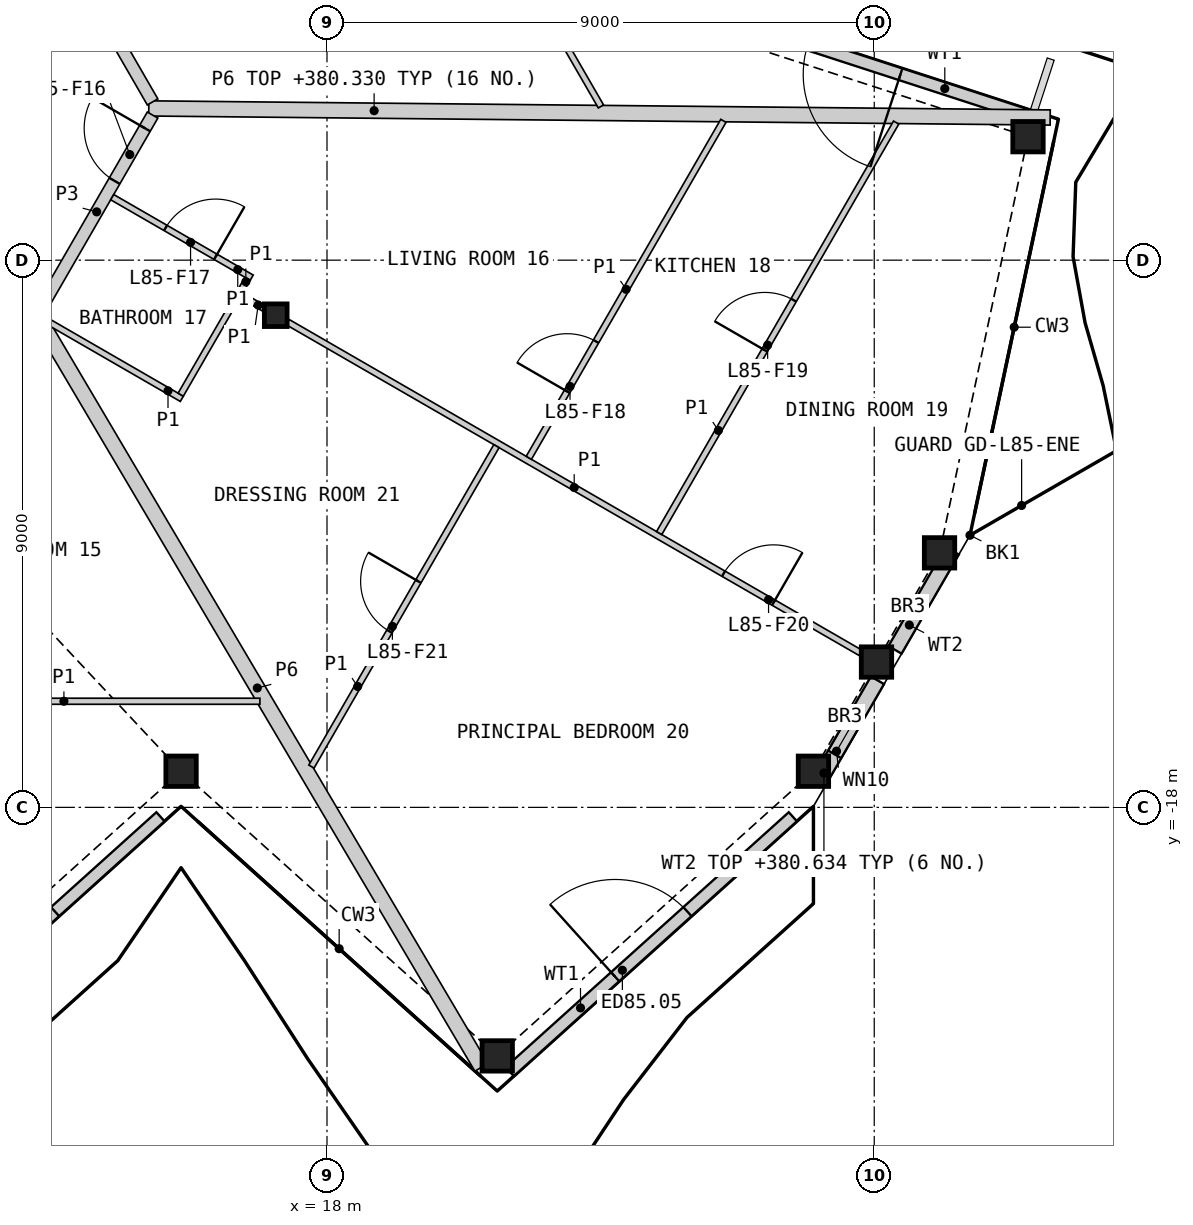
"""IFC4 building model, lengths in metres.
Left out: names, types, materials, properties, quantities, classifications, styles, units other than length and angle.
Written with IfcOpenShell. Run it as: python <this file> out.ifc"""

import sys

from ifc_helpers import new_model, si_unit, direction, frame, frame_2d, origin, origin_2d, place, context, subcontext, project, spatial, rectangle, hollow_rectangle, i_section, extrude, element, fill, save


model = new_model("IFC4")
c1 = context("Model", 3, precision=1e-05, world=origin(), true_north=direction((0.0, 1.0)))
c2 = subcontext(c1, "Body", "Model", "MODEL_VIEW")
j1 = project(units=[si_unit("LENGTHUNIT", "METRE"), si_unit("PLANEANGLEUNIT", "RADIAN")], contexts=[c1])
p1 = place(None, origin())
s1 = spatial("IfcSite", under=j1, at=p1, CompositionType="ELEMENT")
p2 = place(p1, origin())
s2 = spatial("IfcBuilding", under=s1, at=p2, CompositionType="ELEMENT")
p3 = place(p2, frame((0.0, 0.0, 378.0)))
s3 = spatial("IfcBuildingStorey", under=s2, at=p3, CompositionType="ELEMENT", Elevation=378.0)
for number, where, z_axis, x_axis in (
    (1, (15.6, -17.406, 0.0), (0.0, 0.0, 1.0), (1.0, 0.0, 0.0)),
    (2, (20.8, -22.088, 0.0), (0.0, 0.0, 1.0), (1.0, 0.0, 0.0)),
    (3, (26.0, -17.406, 0.0), (0.0, 0.0, 1.0), (1.0, 0.0, 0.0)),
    (4, (27.037, -15.61, 0.0), (0.0, 0.0, 1.0), (1.0, 0.0, 0.0)),
    (5, (28.074, -13.814, 0.0), (0.0, 0.0, 1.0), (1.0, 0.0, 0.0)),
    (6, (29.529, -6.969, 0.0), (0.0, 0.0, 1.0), (1.0, 0.0, 0.0)),
):
    element("IfcColumn", number, at=place(p3, frame(where, z_axis=z_axis, x_axis=x_axis)), inside=s3, PredefinedType="COLUMN", context=c2, shape_type="SweptSolid", body=[
        extrude(hollow_rectangle(XDim=0.5, YDim=0.5, WallThickness=0.03, at=origin_2d()), origin(), (0.0, 0.0, 1.0), 3.4),
    ])
p4 = place(p3, frame((17.157, -9.906, 0.0), z_axis=(0.0, 0.0, 1.0), x_axis=(1.0, 0.0, 0.0)))
e7 = element("IfcColumn", 7, at=p4, inside=s3, PredefinedType="COLUMN", context=c2, shape_type="SweptSolid", body=[
    extrude(i_section(OverallWidth=0.374, OverallDepth=0.372, WebThickness=0.016, FlangeThickness=0.026, at=origin_2d()), origin(), (0.0, 0.0, 1.0), 3.4),
])
p5 = place(p3, frame((10.605, -22.346, 0.0), z_axis=(0.0, 0.0, 1.0), x_axis=(0.743137181878, 0.669139095339, 0.0)))
e8 = element("IfcWall", 8, at=p5, inside=s3, PredefinedType="SOLIDWALL", context=c2, shape_type="SweptSolid", body=[
    extrude(rectangle(XDim=6.265, YDim=0.2, at=frame_2d((3.133, 0.0))), origin(), (0.0, 0.0, 1.0), 2.634),
])
p6 = place(p5, frame((2.333, 0.0, 0.0)))
e9 = element("IfcOpeningElement", 9, at=p6, cuts=e8, PredefinedType="OPENING", context=c2, shape_type="SweptSolid", body=[
    extrude(rectangle(XDim=1.6, YDim=2.25, at=frame_2d((0.8, 1.125))), frame((0.0, 0.11, 0.0), z_axis=(0.0, -1.0, 0.0), x_axis=(1.0, 0.0, 0.0)), (0.0, 0.0, 1.0), 0.22),
])
p7 = place(p3, frame((21.005, -22.346, 0.0), z_axis=(0.0, 0.0, 1.0), x_axis=(0.743137181878, 0.669139095339, 0.0)))
e10 = element("IfcWall", 10, at=p7, inside=s3, PredefinedType="SOLIDWALL", context=c2, shape_type="SweptSolid", body=[
    extrude(rectangle(XDim=6.265, YDim=0.2, at=frame_2d((3.133, 0.0))), origin(), (0.0, 0.0, 1.0), 2.634),
])
p8 = place(p7, frame((2.333, 0.0, 0.0)))
e11 = element("IfcOpeningElement", 11, at=p8, cuts=e10, PredefinedType="OPENING", context=c2, shape_type="SweptSolid", body=[
    extrude(rectangle(XDim=1.6, YDim=2.25, at=frame_2d((0.8, 1.125))), frame((0.0, 0.11, 0.0), z_axis=(0.0, -1.0, 0.0), x_axis=(1.0, 0.0, 0.0)), (0.0, 0.0, 1.0), 0.22),
])
p9 = place(p3, frame((26.075, -17.604, 0.0), z_axis=(0.0, 0.0, 1.0), x_axis=(0.500017700655, 0.866015184065, 0.0)))
e12 = element("IfcWall", 12, at=p9, inside=s3, PredefinedType="SOLIDWALL", context=c2, shape_type="SweptSolid", body=[
    extrude(rectangle(XDim=1.957, YDim=0.25, at=frame_2d((0.978, 0.0))), origin(), (0.0, 0.0, 1.0), 2.634),
])
p10 = place(p9, frame((0.55, 0.0, 0.4)))
e13 = element("IfcOpeningElement", 13, at=p10, cuts=e12, PredefinedType="OPENING", context=c2, shape_type="SweptSolid", body=[
    extrude(rectangle(XDim=0.6, YDim=0.6, at=frame_2d((0.3, 0.3))), frame((0.0, 0.135, 0.0), z_axis=(0.0, -1.0, 0.0), x_axis=(1.0, 0.0, 0.0)), (0.0, 0.0, 1.0), 0.27),
])
p11 = place(p3, frame((27.342, -15.41, 0.0), z_axis=(0.0, 0.0, 1.0), x_axis=(0.500044242988, 0.865999858577, 0.0)))
e14 = element("IfcWall", 14, at=p11, inside=s3, PredefinedType="SOLIDWALL", context=c2, shape_type="SweptSolid", body=[
    extrude(rectangle(XDim=1.883, YDim=0.25, at=frame_2d((0.941, 0.0))), origin(), (0.0, 0.0, 1.0), 2.634),
])
p12 = place(p3, frame((29.65, -6.663, 0.0), z_axis=(0.0, 0.0, 1.0), x_axis=(-0.951056402988, 0.3090173431, 0.0)))
e15 = element("IfcWall", 15, at=p12, inside=s3, PredefinedType="SOLIDWALL", context=c2, shape_type="SweptSolid", body=[
    extrude(rectangle(XDim=6.265, YDim=0.2, at=frame_2d((3.133, 0.0))), origin(), (0.0, 0.0, 1.0), 2.634),
])
p13 = place(p12, frame((2.333, 0.0, 0.0)))
e16 = element("IfcOpeningElement", 16, at=p13, cuts=e15, PredefinedType="OPENING", context=c2, shape_type="SweptSolid", body=[
    extrude(rectangle(XDim=1.6, YDim=2.25, at=frame_2d((0.8, 1.125))), frame((0.0, 0.11, 0.0), z_axis=(0.0, -1.0, 0.0), x_axis=(1.0, 0.0, 0.0)), (0.0, 0.0, 1.0), 0.22),
])
p14 = place(p3, frame((15.069, -6.504, 0.0), z_axis=(0.0, 0.0, 1.0), x_axis=(0.999949045807, -0.01009483976, 0.0)))
e17 = element("IfcWall", 17, at=p14, inside=s3, PredefinedType="PARTITIONING", context=c2, shape_type="SweptSolid", body=[
    extrude(rectangle(XDim=14.825, YDim=0.25, at=frame_2d((7.413, 0.0))), origin(), (0.0, 0.0, 1.0), 2.33),
])
p15 = place(p3, frame((13.167, -9.798, 0.0), z_axis=(0.0, 0.0, 1.0), x_axis=(0.508707178493, -0.860939606796, 0.0)))
e18 = element("IfcWall", 18, at=p15, inside=s3, PredefinedType="PARTITIONING", context=c2, shape_type="SweptSolid", body=[
    extrude(rectangle(XDim=14.493, YDim=0.25, at=frame_2d((7.247, 0.0))), origin(), (0.0, 0.0, 1.0), 2.33),
])
p16 = place(p3, frame((12.981, -2.673, 0.0), z_axis=(0.0, 0.0, 1.0), x_axis=(0.499986217557, -0.866033360935, 0.0)))
e19 = element("IfcWall", 19, at=p16, inside=s3, PredefinedType="PARTITIONING", context=c2, shape_type="SweptSolid", body=[
    extrude(rectangle(XDim=4.3, YDim=0.2, at=frame_2d((2.15, 0.0))), origin(), (0.0, 0.0, 1.0), 3.1),
])
p17 = place(p3, frame((13.293, -9.797, 0.0), z_axis=(0.0, 0.0, 1.0), x_axis=(0.499967746641, 0.866044024469, 0.0)))
e20 = element("IfcWall", 20, at=p17, inside=s3, PredefinedType="PARTITIONING", context=c2, shape_type="SweptSolid", body=[
    extrude(rectangle(XDim=3.676, YDim=0.2, at=frame_2d((1.838, 0.0))), origin(), (0.0, 0.0, 1.0), 3.1),
])
p18 = place(p17, frame((2.426, 0.0, 0.0)))
e21 = element("IfcOpeningElement", 21, at=p18, cuts=e20, PredefinedType="OPENING", context=c2, shape_type="SweptSolid", body=[
    extrude(rectangle(XDim=1.0, YDim=2.1, at=frame_2d((0.5, 1.05))), frame((0.0, 0.11, 0.0), z_axis=(0.0, -1.0, 0.0), x_axis=(1.0, 0.0, 0.0)), (0.0, 0.0, 1.0), 0.22),
])
p19 = place(p3, frame((17.354, -10.019, 0.0), z_axis=(0.0, 0.0, 1.0), x_axis=(0.866019680922, -0.500009912158, 0.0)))
e22 = element("IfcWall", 22, at=p19, inside=s3, PredefinedType="PARTITIONING", context=c2, shape_type="SweptSolid", body=[
    extrude(rectangle(XDim=10.881, YDim=0.1, at=frame_2d((5.44, 0.0))), origin(), (0.0, 0.0, 1.0), 2.33),
])
p20 = place(p19, frame((8.276, 0.0, 0.0)))
e23 = element("IfcOpeningElement", 23, at=p20, cuts=e22, PredefinedType="OPENING", context=c2, shape_type="SweptSolid", body=[
    extrude(rectangle(XDim=0.95, YDim=2.1, at=frame_2d((0.475, 1.05))), frame((0.0, 0.06, 0.0), z_axis=(0.0, -1.0, 0.0), x_axis=(1.0, 0.0, 0.0)), (0.0, 0.0, 1.0), 0.12),
])
p21 = place(p3, frame((23.463, -13.488, 0.0), z_axis=(0.0, 0.0, 1.0), x_axis=(0.500012519194, 0.866018175704, 0.0)))
e24 = element("IfcWall", 24, at=p21, inside=s3, PredefinedType="PARTITIONING", context=c2, shape_type="SweptSolid", body=[
    extrude(rectangle(XDim=7.796, YDim=0.1, at=frame_2d((3.898, 0.0))), origin(), (0.0, 0.0, 1.0), 2.33),
])
p22 = place(p21, frame((3.473, 0.0, 0.0)))
e25 = element("IfcOpeningElement", 25, at=p22, cuts=e24, PredefinedType="OPENING", context=c2, shape_type="SweptSolid", body=[
    extrude(rectangle(XDim=0.95, YDim=2.1, at=frame_2d((0.475, 1.05))), frame((0.0, 0.06, 0.0), z_axis=(0.0, -1.0, 0.0), x_axis=(1.0, 0.0, 0.0)), (0.0, 0.0, 1.0), 0.12),
])
p23 = place(p3, frame((19.302, -0.923, 0.0), z_axis=(0.0, 0.0, 1.0), x_axis=(0.499999516514, -0.866025682925, 0.0)))
e26 = element("IfcWall", 26, at=p23, inside=s3, PredefinedType="PARTITIONING", context=c2, shape_type="SweptSolid", body=[
    extrude(rectangle(XDim=6.407, YDim=0.1, at=frame_2d((3.204, 0.0))), origin(), (0.0, 0.0, 1.0), 2.33),
])
p24 = place(p23, frame((2.476, 0.0, 0.0)))
e27 = element("IfcOpeningElement", 27, at=p24, cuts=e26, PredefinedType="OPENING", context=c2, shape_type="SweptSolid", body=[
    extrude(rectangle(XDim=0.95, YDim=2.1, at=frame_2d((0.475, 1.05))), frame((0.0, 0.06, 0.0), z_axis=(0.0, -1.0, 0.0), x_axis=(1.0, 0.0, 0.0)), (0.0, 0.0, 1.0), 0.12),
])
p25 = place(p3, frame((21.319, -12.251, 0.0), z_axis=(0.0, 0.0, 1.0), x_axis=(0.499999833739, 0.866025499775, 0.0)))
e28 = element("IfcWall", 28, at=p25, inside=s3, PredefinedType="PARTITIONING", context=c2, shape_type="SweptSolid", body=[
    extrude(rectangle(XDim=6.4, YDim=0.1, at=frame_2d((3.2, 0.0))), origin(), (0.0, 0.0, 1.0), 2.33),
])
p26 = place(p25, frame((1.26, 0.0, 0.0)))
e29 = element("IfcOpeningElement", 29, at=p26, cuts=e28, PredefinedType="OPENING", context=c2, shape_type="SweptSolid", body=[
    extrude(rectangle(XDim=0.95, YDim=2.1, at=frame_2d((0.475, 1.05))), frame((0.0, 0.06, 0.0), z_axis=(0.0, -1.0, 0.0), x_axis=(1.0, 0.0, 0.0)), (0.0, 0.0, 1.0), 0.12),
])
p27 = place(p3, frame((10.45, -16.255, 0.0), z_axis=(0.0, 0.0, 1.0), x_axis=(1.0, 0.0, 0.0)))
e30 = element("IfcWall", 30, at=p27, inside=s3, PredefinedType="PARTITIONING", context=c2, shape_type="SweptSolid", body=[
    extrude(rectangle(XDim=6.447, YDim=0.1, at=frame_2d((3.223, 0.0))), origin(), (0.0, 0.0, 1.0), 2.33),
])
p28 = place(p27, frame((0.76, 0.0, 0.0)))
e31 = element("IfcOpeningElement", 31, at=p28, cuts=e30, PredefinedType="OPENING", context=c2, shape_type="SweptSolid", body=[
    extrude(rectangle(XDim=0.95, YDim=2.1, at=frame_2d((0.475, 1.05))), frame((0.0, 0.06, 0.0), z_axis=(0.0, -1.0, 0.0), x_axis=(1.0, 0.0, 0.0)), (0.0, 0.0, 1.0), 0.12),
])
p29 = place(p3, frame((17.744, -17.329, 0.0), z_axis=(0.0, 0.0, 1.0), x_axis=(0.49997479812, 0.866039953608, 0.0)))
e32 = element("IfcWall", 32, at=p29, inside=s3, PredefinedType="PARTITIONING", context=c2, shape_type="SweptSolid", body=[
    extrude(rectangle(XDim=6.086, YDim=0.1, at=frame_2d((3.043, 0.0))), origin(), (0.0, 0.0, 1.0), 2.33),
])
p30 = place(p29, frame((2.568, 0.0, 0.0)))
e33 = element("IfcOpeningElement", 33, at=p30, cuts=e32, PredefinedType="OPENING", context=c2, shape_type="SweptSolid", body=[
    extrude(rectangle(XDim=0.95, YDim=2.1, at=frame_2d((0.475, 1.05))), frame((0.0, 0.06, 0.0), z_axis=(0.0, -1.0, 0.0), x_axis=(1.0, 0.0, 0.0)), (0.0, 0.0, 1.0), 0.12),
])
p31 = place(p3, frame((13.339, -9.968, 0.0), z_axis=(0.0, 0.0, 1.0), x_axis=(0.866013657776, -0.500020344131, 0.0)))
e34 = element("IfcWall", 34, at=p31, inside=s3, PredefinedType="PARTITIONING", context=c2, shape_type="SweptSolid", body=[
    extrude(rectangle(XDim=2.625, YDim=0.1, at=frame_2d((1.312, 0.0))), origin(), (0.0, 0.0, 1.0), 2.33),
])
p32 = place(p3, frame((14.467, -7.964, 0.0), z_axis=(0.0, 0.0, 1.0), x_axis=(0.866062824362, -0.499935180056, 0.0)))
e35 = element("IfcWall", 35, at=p32, inside=s3, PredefinedType="PARTITIONING", context=c2, shape_type="SweptSolid", body=[
    extrude(rectangle(XDim=2.649, YDim=0.1, at=frame_2d((1.325, 0.0))), origin(), (0.0, 0.0, 1.0), 2.33),
])
p33 = place(p32, frame((1.013, 0.0, 0.0)))
e36 = element("IfcOpeningElement", 36, at=p33, cuts=e35, PredefinedType="OPENING", context=c2, shape_type="SweptSolid", body=[
    extrude(rectangle(XDim=0.95, YDim=2.1, at=frame_2d((0.475, 1.05))), frame((0.0, 0.06, 0.0), z_axis=(0.0, -1.0, 0.0), x_axis=(1.0, 0.0, 0.0)), (0.0, 0.0, 1.0), 0.12),
])
p34 = place(p3, frame((15.594, -11.212, 0.0), z_axis=(0.0, 0.0, 1.0), x_axis=(0.499958068602, 0.866049611535, 0.0)))
e37 = element("IfcWall", 37, at=p34, inside=s3, PredefinedType="PARTITIONING", context=c2, shape_type="SweptSolid", body=[
    extrude(rectangle(XDim=1.973, YDim=0.1, at=frame_2d((0.987, 0.0))), origin(), (0.0, 0.0, 1.0), 2.33),
])
p35 = place(p3, frame((16.594, -9.581, 0.0), z_axis=(0.0, 0.0, 1.0), x_axis=(0.866137484628, -0.499805820016, 0.0)))
e38 = element("IfcWall", 38, at=p35, inside=s3, PredefinedType="PARTITIONING", context=c2, shape_type="SweptSolid", body=[
    extrude(rectangle(XDim=0.423, YDim=0.1, at=frame_2d((0.211, 0.0))), origin(), (0.0, 0.0, 1.0), 2.33),
])
p36 = place(p3, frame((16.582, -9.501, 0.0), z_axis=(0.0, 0.0, 1.0), x_axis=(0.49742780181, 0.86750537865, 0.0)))
e39 = element("IfcWall", 39, at=p36, inside=s3, PredefinedType="PARTITIONING", context=c2, shape_type="SweptSolid", body=[
    extrude(rectangle(XDim=0.224, YDim=0.1, at=frame_2d((0.112, 0.0))), origin(), (0.0, 0.0, 1.0), 2.33),
])
p37 = place(p6, origin())
e40 = element("IfcDoor", 40, at=p37, inside=s3, OperationType="DOUBLE_DOOR_SINGLE_SWING", PredefinedType="DOOR", context=c2, shape_type="SweptSolid", body=[
    extrude(rectangle(XDim=1.6, YDim=2.25, at=frame_2d((0.8, 1.125))), frame((0.0, 0.025, 0.0), z_axis=(0.0, -1.0, 0.0), x_axis=(1.0, 0.0, 0.0)), (0.0, 0.0, 1.0), 0.05),
])
fill(e9, e40)
p38 = place(p8, origin())
e41 = element("IfcDoor", 41, at=p38, inside=s3, OperationType="DOUBLE_DOOR_SINGLE_SWING", PredefinedType="DOOR", context=c2, shape_type="SweptSolid", body=[
    extrude(rectangle(XDim=1.6, YDim=2.25, at=frame_2d((0.8, 1.125))), frame((0.0, 0.025, 0.0), z_axis=(0.0, -1.0, 0.0), x_axis=(1.0, 0.0, 0.0)), (0.0, 0.0, 1.0), 0.05),
])
fill(e11, e41)
p39 = place(p10, origin())
e42 = element("IfcWindow", 42, at=p39, inside=s3, PartitioningType="SINGLE_PANEL", PredefinedType="WINDOW", context=c2, shape_type="SweptSolid", body=[
    extrude(rectangle(XDim=0.6, YDim=0.6, at=frame_2d((0.3, 0.3))), frame((0.0, 0.03, 0.0), z_axis=(0.0, -1.0, 0.0), x_axis=(1.0, 0.0, 0.0)), (0.0, 0.0, 1.0), 0.06),
])
fill(e13, e42)
p40 = place(p13, origin())
e43 = element("IfcDoor", 43, at=p40, inside=s3, OperationType="DOUBLE_DOOR_SINGLE_SWING", PredefinedType="DOOR", context=c2, shape_type="SweptSolid", body=[
    extrude(rectangle(XDim=1.6, YDim=2.25, at=frame_2d((0.8, 1.125))), frame((0.0, 0.025, 0.0), z_axis=(0.0, -1.0, 0.0), x_axis=(1.0, 0.0, 0.0)), (0.0, 0.0, 1.0), 0.05),
])
fill(e16, e43)
p41 = place(p18, origin())
e44 = element("IfcDoor", 44, at=p41, inside=s3, OperationType="SINGLE_SWING_RIGHT", PredefinedType="DOOR", context=c2, shape_type="SweptSolid", body=[
    extrude(rectangle(XDim=1.0, YDim=2.1, at=frame_2d((0.5, 1.05))), frame((0.0, 0.025, 0.0), z_axis=(0.0, -1.0, 0.0), x_axis=(1.0, 0.0, 0.0)), (0.0, 0.0, 1.0), 0.05),
])
fill(e21, e44)
p42 = place(p33, origin())
e45 = element("IfcDoor", 45, at=p42, inside=s3, OperationType="SINGLE_SWING_RIGHT", PredefinedType="DOOR", context=c2, shape_type="SweptSolid", body=[
    extrude(rectangle(XDim=0.95, YDim=2.1, at=frame_2d((0.475, 1.05))), frame((0.0, 0.025, 0.0), z_axis=(0.0, -1.0, 0.0), x_axis=(1.0, 0.0, 0.0)), (0.0, 0.0, 1.0), 0.05),
])
fill(e36, e45)
p43 = place(p26, origin())
e46 = element("IfcDoor", 46, at=p43, inside=s3, OperationType="SINGLE_SWING_LEFT", PredefinedType="DOOR", context=c2, shape_type="SweptSolid", body=[
    extrude(rectangle(XDim=0.95, YDim=2.1, at=frame_2d((0.475, 1.05))), frame((0.0, 0.025, 0.0), z_axis=(0.0, -1.0, 0.0), x_axis=(1.0, 0.0, 0.0)), (0.0, 0.0, 1.0), 0.05),
])
fill(e29, e46)
p44 = place(p22, origin())
e47 = element("IfcDoor", 47, at=p44, inside=s3, OperationType="SINGLE_SWING_LEFT", PredefinedType="DOOR", context=c2, shape_type="SweptSolid", body=[
    extrude(rectangle(XDim=0.95, YDim=2.1, at=frame_2d((0.475, 1.05))), frame((0.0, 0.025, 0.0), z_axis=(0.0, -1.0, 0.0), x_axis=(1.0, 0.0, 0.0)), (0.0, 0.0, 1.0), 0.05),
])
fill(e25, e47)
p45 = place(p20, origin())
e48 = element("IfcDoor", 48, at=p45, inside=s3, OperationType="SINGLE_SWING_RIGHT", PredefinedType="DOOR", context=c2, shape_type="SweptSolid", body=[
    extrude(rectangle(XDim=0.95, YDim=2.1, at=frame_2d((0.475, 1.05))), frame((0.0, 0.025, 0.0), z_axis=(0.0, -1.0, 0.0), x_axis=(1.0, 0.0, 0.0)), (0.0, 0.0, 1.0), 0.05),
])
fill(e23, e48)
p46 = place(p30, origin())
e49 = element("IfcDoor", 49, at=p46, inside=s3, OperationType="SINGLE_SWING_RIGHT", PredefinedType="DOOR", context=c2, shape_type="SweptSolid", body=[
    extrude(rectangle(XDim=0.95, YDim=2.1, at=frame_2d((0.475, 1.05))), frame((0.0, 0.025, 0.0), z_axis=(0.0, -1.0, 0.0), x_axis=(1.0, 0.0, 0.0)), (0.0, 0.0, 1.0), 0.05),
])
fill(e33, e49)
save(model, sys.argv[1])
